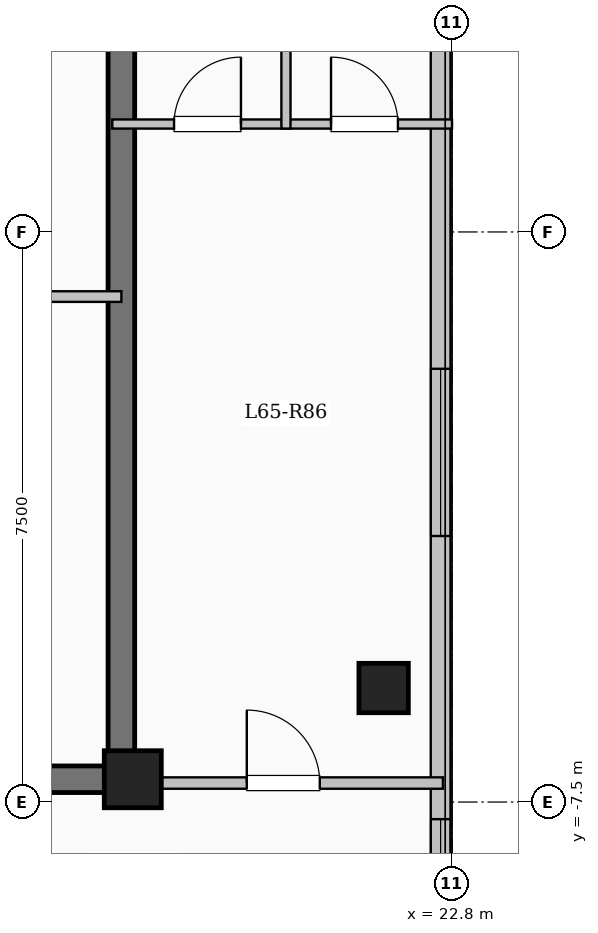
"""IFC4 building model, lengths in metres.
Left out: names, types, materials, properties, quantities, classifications, styles, units other than length and angle.
Written with IfcOpenShell. Run it as: python <this file> out.ifc"""

import sys

from ifc_helpers import new_model, si_unit, direction, frame, frame_2d, origin, origin_2d, place, context, subcontext, project, spatial, rectangle, extrude, element, fill, save


model = new_model("IFC4")
c1 = context("Model", 3, precision=1e-05, world=origin(), true_north=direction((0.0, 1.0)))
c2 = subcontext(c1, "Body", "Model", "MODEL_VIEW")
j1 = project(units=[si_unit("LENGTHUNIT", "METRE"), si_unit("PLANEANGLEUNIT", "RADIAN")], contexts=[c1])
p1 = place(None, origin())
s1 = spatial("IfcSite", under=j1, at=p1, CompositionType="ELEMENT")
p2 = place(p1, origin())
s2 = spatial("IfcBuilding", under=s1, at=p2, CompositionType="ELEMENT")
p3 = place(p2, frame((0.0, 0.0, 241.5)))
s3 = spatial("IfcBuildingStorey", under=s2, at=p3, CompositionType="ELEMENT", Elevation=241.5)
p4 = place(p3, frame((18.6, -7.2, 0.0), z_axis=(0.0, 0.0, 1.0), x_axis=(1.0, 0.0, 0.0)))
e1 = element("IfcColumn", 1, at=p4, inside=s3, PredefinedType="COLUMN", context=c2, shape_type="SweptSolid", body=[
    extrude(rectangle(XDim=0.75, YDim=0.75, at=origin_2d()), origin(), (0.0, 0.0, 1.0), 3.35),
])
p5 = place(p3, frame((21.9, -6.0, 0.0), z_axis=(0.0, 0.0, 1.0), x_axis=(1.0, 0.0, 0.0)))
e2 = element("IfcColumn", 2, at=p5, inside=s3, PredefinedType="COLUMN", context=c2, shape_type="SweptSolid", body=[
    extrude(rectangle(XDim=0.65, YDim=0.65, at=origin_2d()), origin(), (0.0, 0.0, 1.0), 3.35),
])
p6 = place(p3, frame((22.65, 17.55, 0.0), z_axis=(0.0, 0.0, 1.0), x_axis=(0.0, -1.0, 0.0)))
e3 = element("IfcWall", 3, at=p6, inside=s3, PredefinedType="SOLIDWALL", context=c2, shape_type="SweptSolid", body=[
    extrude(rectangle(XDim=35.1, YDim=0.26, at=frame_2d((17.55, 0.0))), origin(), (0.0, 0.0, 1.0), 3.1),
])
p7 = place(p6, frame((1.525, 0.0, 0.9)))
e4 = element("IfcOpeningElement", 4, at=p7, cuts=e3, PredefinedType="OPENING", context=c2, shape_type="SweptSolid", body=[
    extrude(rectangle(XDim=2.0, YDim=1.7, at=frame_2d((1.0, 0.85))), frame((0.0, 0.14, 0.0), z_axis=(0.0, -1.0, 0.0), x_axis=(1.0, 0.0, 0.0)), (0.0, 0.0, 1.0), 0.28),
])
p8 = place(p6, frame((5.425, 0.0, 0.95)))
e5 = element("IfcOpeningElement", 5, at=p8, cuts=e3, PredefinedType="OPENING", context=c2, shape_type="SweptSolid", body=[
    extrude(rectangle(XDim=1.0, YDim=1.5, at=frame_2d((0.5, 0.75))), frame((0.0, 0.14, 0.0), z_axis=(0.0, -1.0, 0.0), x_axis=(1.0, 0.0, 0.0)), (0.0, 0.0, 1.0), 0.28),
])
p9 = place(p6, frame((8.675, 0.0, 0.9)))
e6 = element("IfcOpeningElement", 6, at=p9, cuts=e3, PredefinedType="OPENING", context=c2, shape_type="SweptSolid", body=[
    extrude(rectangle(XDim=2.0, YDim=1.7, at=frame_2d((1.0, 0.85))), frame((0.0, 0.14, 0.0), z_axis=(0.0, -1.0, 0.0), x_axis=(1.0, 0.0, 0.0)), (0.0, 0.0, 1.0), 0.28),
])
p10 = place(p6, frame((13.5, 0.0, 0.9)))
e7 = element("IfcOpeningElement", 7, at=p10, cuts=e3, PredefinedType="OPENING", context=c2, shape_type="SweptSolid", body=[
    extrude(rectangle(XDim=1.65, YDim=1.6, at=frame_2d((0.825, 0.8))), frame((0.0, 0.14, 0.0), z_axis=(0.0, -1.0, 0.0), x_axis=(1.0, 0.0, 0.0)), (0.0, 0.0, 1.0), 0.28),
])
p11 = place(p6, frame((19.35, 0.0, 0.9)))
e8 = element("IfcOpeningElement", 8, at=p11, cuts=e3, PredefinedType="OPENING", context=c2, shape_type="SweptSolid", body=[
    extrude(rectangle(XDim=2.2, YDim=1.75, at=frame_2d((1.1, 0.875))), frame((0.0, 0.14, 0.0), z_axis=(0.0, -1.0, 0.0), x_axis=(1.0, 0.0, 0.0)), (0.0, 0.0, 1.0), 0.28),
])
p12 = place(p6, frame((25.275, 0.0, 0.95)))
e9 = element("IfcOpeningElement", 9, at=p12, cuts=e3, PredefinedType="OPENING", context=c2, shape_type="SweptSolid", body=[
    extrude(rectangle(XDim=1.2, YDim=1.5, at=frame_2d((0.6, 0.75))), frame((0.0, 0.14, 0.0), z_axis=(0.0, -1.0, 0.0), x_axis=(1.0, 0.0, 0.0)), (0.0, 0.0, 1.0), 0.28),
])
p13 = place(p6, frame((29.925, 0.0, 0.9)))
e10 = element("IfcOpeningElement", 10, at=p13, cuts=e3, PredefinedType="OPENING", context=c2, shape_type="SweptSolid", body=[
    extrude(rectangle(XDim=2.2, YDim=1.75, at=frame_2d((1.1, 0.875))), frame((0.0, 0.14, 0.0), z_axis=(0.0, -1.0, 0.0), x_axis=(1.0, 0.0, 0.0)), (0.0, 0.0, 1.0), 0.28),
])
p14 = place(p3, frame((18.45, -7.375, 0.0), z_axis=(0.0, 0.0, 1.0), x_axis=(0.0, 1.0, 0.0)))
e11 = element("IfcWall", 11, at=p14, inside=s3, PredefinedType="SHEAR", context=c2, shape_type="SweptSolid", body=[
    extrude(rectangle(XDim=14.05, YDim=0.35, at=frame_2d((7.025, 0.0))), origin(), (0.0, 0.0, 1.0), 3.35),
])
p15 = place(p3, frame((12.625, -7.2, 0.0), z_axis=(0.0, 0.0, 1.0), x_axis=(1.0, 0.0, 0.0)))
e12 = element("IfcWall", 12, at=p15, inside=s3, PredefinedType="SHEAR", context=c2, shape_type="SweptSolid", body=[
    extrude(rectangle(XDim=6.0, YDim=0.35, at=frame_2d((3.0, 0.0))), origin(), (0.0, 0.0, 1.0), 3.35),
])
p16 = place(p3, frame((15.4, -0.85, 0.0), z_axis=(0.0, 0.0, 1.0), x_axis=(1.0, 0.0, 0.0)))
e13 = element("IfcWall", 13, at=p16, inside=s3, PredefinedType="PARTITIONING", context=c2, shape_type="SweptSolid", body=[
    extrude(rectangle(XDim=3.05, YDim=0.14, at=frame_2d((1.525, 0.0))), origin(), (0.0, 0.0, 1.0), 3.1),
])
p17 = place(p16, frame((1.05, 0.0, 0.0)))
e14 = element("IfcOpeningElement", 14, at=p17, cuts=e13, PredefinedType="OPENING", context=c2, shape_type="SweptSolid", body=[
    extrude(rectangle(XDim=0.9, YDim=2.08, at=frame_2d((0.45, 1.04))), frame((0.0, 0.08, 0.0), z_axis=(0.0, -1.0, 0.0), x_axis=(1.0, 0.0, 0.0)), (0.0, 0.0, 1.0), 0.16),
])
p18 = place(p3, frame((18.45, -7.25, 0.0), z_axis=(0.0, 0.0, 1.0), x_axis=(1.0, 0.0, 0.0)))
e15 = element("IfcWall", 15, at=p18, inside=s3, PredefinedType="PARTITIONING", context=c2, shape_type="SweptSolid", body=[
    extrude(rectangle(XDim=4.23, YDim=0.15, at=frame_2d((2.115, 0.0))), origin(), (0.0, 0.0, 1.0), 3.1),
])
p19 = place(p18, frame((1.65, 0.0, 0.0)))
e16 = element("IfcOpeningElement", 16, at=p19, cuts=e15, PredefinedType="OPENING", context=c2, shape_type="SweptSolid", body=[
    extrude(rectangle(XDim=0.96, YDim=2.15, at=frame_2d((0.48, 1.075))), frame((0.0, 0.085, 0.0), z_axis=(0.0, -1.0, 0.0), x_axis=(1.0, 0.0, 0.0)), (0.0, 0.0, 1.0), 0.17),
])
p20 = place(p3, frame((18.33, 1.42, 0.0), z_axis=(0.0, 0.0, 1.0), x_axis=(1.0, 0.0, 0.0)))
e17 = element("IfcWall", 17, at=p20, inside=s3, PredefinedType="PARTITIONING", context=c2, shape_type="SweptSolid", body=[
    extrude(rectangle(XDim=4.47, YDim=0.12, at=frame_2d((2.235, 0.0))), origin(), (0.0, 0.0, 1.0), 3.1),
])
p21 = place(p20, frame((0.813, 0.0, 0.0)))
e18 = element("IfcOpeningElement", 18, at=p21, cuts=e17, PredefinedType="OPENING", context=c2, shape_type="SweptSolid", body=[
    extrude(rectangle(XDim=0.88, YDim=2.1, at=frame_2d((0.44, 1.05))), frame((0.0, 0.07, 0.0), z_axis=(0.0, -1.0, 0.0), x_axis=(1.0, 0.0, 0.0)), (0.0, 0.0, 1.0), 0.14),
])
p22 = place(p20, frame((2.878, 0.0, 0.0)))
e19 = element("IfcOpeningElement", 19, at=p22, cuts=e17, PredefinedType="OPENING", context=c2, shape_type="SweptSolid", body=[
    extrude(rectangle(XDim=0.88, YDim=2.1, at=frame_2d((0.44, 1.05))), frame((0.0, 0.07, 0.0), z_axis=(0.0, -1.0, 0.0), x_axis=(1.0, 0.0, 0.0)), (0.0, 0.0, 1.0), 0.14),
])
p23 = place(p3, frame((20.615, 1.36, 0.0), z_axis=(0.0, 0.0, 1.0), x_axis=(0.0, 1.0, 0.0)))
e20 = element("IfcWall", 20, at=p23, inside=s3, PredefinedType="PARTITIONING", context=c2, shape_type="SweptSolid", body=[
    extrude(rectangle(XDim=3.58, YDim=0.12, at=frame_2d((1.79, 0.0))), origin(), (0.0, 0.0, 1.0), 3.1),
])
p24 = place(p11, origin())
e21 = element("IfcWindow", 21, at=p24, inside=s3, PartitioningType="SINGLE_PANEL", PredefinedType="WINDOW", context=c2, shape_type="SweptSolid", body=[
    extrude(rectangle(XDim=2.2, YDim=1.75, at=frame_2d((1.1, 0.875))), frame((0.0, 0.03, 0.0), z_axis=(0.0, -1.0, 0.0), x_axis=(1.0, 0.0, 0.0)), (0.0, 0.0, 1.0), 0.06),
])
fill(e8, e21)
p25 = place(p12, origin())
e22 = element("IfcWindow", 22, at=p25, inside=s3, PartitioningType="SINGLE_PANEL", PredefinedType="WINDOW", context=c2, shape_type="SweptSolid", body=[
    extrude(rectangle(XDim=1.2, YDim=1.5, at=frame_2d((0.6, 0.75))), frame((0.0, 0.03, 0.0), z_axis=(0.0, -1.0, 0.0), x_axis=(1.0, 0.0, 0.0)), (0.0, 0.0, 1.0), 0.06),
])
fill(e9, e22)
p26 = place(p19, origin())
e23 = element("IfcDoor", 23, at=p26, inside=s3, OperationType="SINGLE_SWING_LEFT", PredefinedType="DOOR", context=c2, shape_type="SweptSolid", body=[
    extrude(rectangle(XDim=0.96, YDim=2.15, at=frame_2d((0.48, 1.075))), frame((0.0, 0.025, 0.0), z_axis=(0.0, -1.0, 0.0), x_axis=(1.0, 0.0, 0.0)), (0.0, 0.0, 1.0), 0.05),
])
fill(e16, e23)
p27 = place(p21, origin())
e24 = element("IfcDoor", 24, at=p27, inside=s3, OperationType="SINGLE_SWING_RIGHT", PredefinedType="DOOR", context=c2, shape_type="SweptSolid", body=[
    extrude(rectangle(XDim=0.88, YDim=2.1, at=frame_2d((0.44, 1.05))), frame((0.0, 0.025, 0.0), z_axis=(0.0, -1.0, 0.0), x_axis=(1.0, 0.0, 0.0)), (0.0, 0.0, 1.0), 0.05),
])
fill(e18, e24)
p28 = place(p22, origin())
e25 = element("IfcDoor", 25, at=p28, inside=s3, OperationType="SINGLE_SWING_LEFT", PredefinedType="DOOR", context=c2, shape_type="SweptSolid", body=[
    extrude(rectangle(XDim=0.88, YDim=2.1, at=frame_2d((0.44, 1.05))), frame((0.0, 0.025, 0.0), z_axis=(0.0, -1.0, 0.0), x_axis=(1.0, 0.0, 0.0)), (0.0, 0.0, 1.0), 0.05),
])
fill(e19, e25)
save(model, sys.argv[1])
